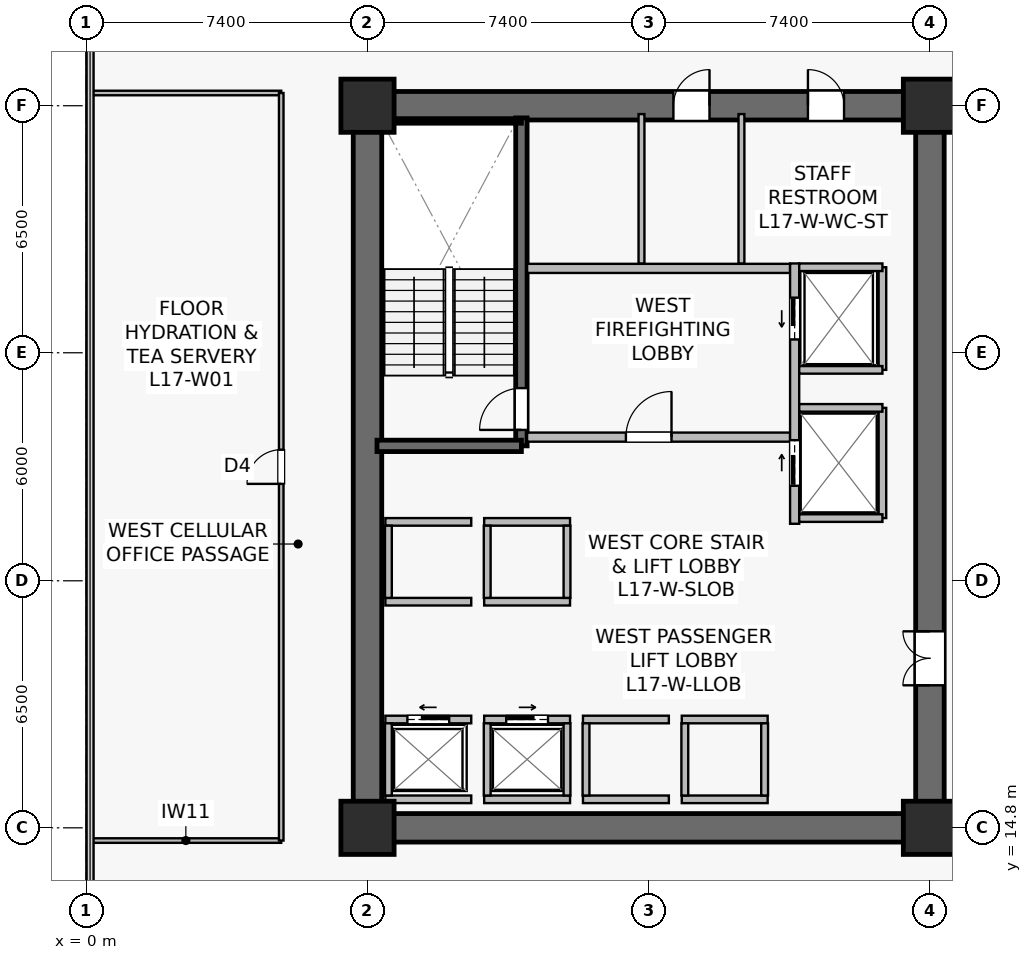
"""IFC4 building model, lengths in metres.
Left out: names, types, materials, properties, quantities, classifications, styles, units other than length and angle.
Written with IfcOpenShell. Run it as: python <this file> out.ifc"""

import sys

from ifc_helpers import new_model, si_unit, direction, frame, frame_2d, origin, origin_2d, place, context, subcontext, project, spatial, rectangle, extrude, source, transform, mapped, element, fill, save


model = new_model("IFC4")
c1 = context("Model", 3, precision=1e-05, world=origin(), true_north=direction((0.0, 1.0)))
c2 = subcontext(c1, "Body", "Model", "MODEL_VIEW")
j1 = project(units=[si_unit("LENGTHUNIT", "METRE"), si_unit("PLANEANGLEUNIT", "RADIAN")], contexts=[c1])
p1 = place(None, origin())
s1 = spatial("IfcSite", under=j1, at=p1, CompositionType="ELEMENT")
p2 = place(p1, origin())
s2 = spatial("IfcBuilding", under=s1, at=p2, CompositionType="ELEMENT")
p3 = place(p2, frame((0.0, 0.0, 70.3)))
s3 = spatial("IfcBuildingStorey", under=s2, at=p3, CompositionType="ELEMENT", Elevation=70.3)
p4 = place(p3, frame((7.025, 14.8, 0.0), z_axis=(0.0, 0.0, 1.0), x_axis=(1.0, 0.0, 0.0)))
e1 = element("IfcWall", 1, at=p4, inside=s3, PredefinedType="SHEAR", context=c2, shape_type="SweptSolid", body=[
    extrude(rectangle(XDim=15.55, YDim=0.75, at=frame_2d((7.775, 0.0))), origin(), (0.0, 0.0, 1.0), 3.78),
])
p5 = place(p3, frame((7.025, 33.8, 0.0), z_axis=(0.0, 0.0, 1.0), x_axis=(1.0, 0.0, 0.0)))
e2 = element("IfcWall", 2, at=p5, inside=s3, PredefinedType="SHEAR", context=c2, shape_type="SweptSolid", body=[
    extrude(rectangle(XDim=15.55, YDim=0.75, at=frame_2d((7.775, 0.0))), origin(), (0.0, 0.0, 1.0), 3.78),
])
p6 = place(p5, frame((8.425, 0.0, 0.0)))
e3 = element("IfcOpeningElement", 3, at=p6, cuts=e2, PredefinedType="OPENING", context=c2, shape_type="SweptSolid", body=[
    extrude(rectangle(XDim=0.95, YDim=2.15, at=frame_2d((0.475, 1.075))), frame((0.0, 0.385, 0.0), z_axis=(0.0, -1.0, 0.0), x_axis=(1.0, 0.0, 0.0)), (0.0, 0.0, 1.0), 0.77),
])
p7 = place(p5, frame((11.965, 0.0, 0.0)))
e4 = element("IfcOpeningElement", 4, at=p7, cuts=e2, PredefinedType="OPENING", context=c2, shape_type="SweptSolid", body=[
    extrude(rectangle(XDim=0.95, YDim=2.15, at=frame_2d((0.475, 1.075))), frame((0.0, 0.385, 0.0), z_axis=(0.0, -1.0, 0.0), x_axis=(1.0, 0.0, 0.0)), (0.0, 0.0, 1.0), 0.77),
])
p8 = place(p3, frame((7.4, 15.175, 0.0), z_axis=(0.0, 0.0, 1.0), x_axis=(0.0, 1.0, 0.0)))
e5 = element("IfcWall", 5, at=p8, inside=s3, PredefinedType="SHEAR", context=c2, shape_type="SweptSolid", body=[
    extrude(rectangle(XDim=18.25, YDim=0.75, at=frame_2d((9.125, 0.0))), origin(), (0.0, 0.0, 1.0), 3.78),
])
p9 = place(p3, frame((22.2, 15.175, 0.0), z_axis=(0.0, 0.0, 1.0), x_axis=(0.0, 1.0, 0.0)))
e6 = element("IfcWall", 6, at=p9, inside=s3, PredefinedType="SHEAR", context=c2, shape_type="SweptSolid", body=[
    extrude(rectangle(XDim=18.25, YDim=0.75, at=frame_2d((9.125, 0.0))), origin(), (0.0, 0.0, 1.0), 3.78),
])
p10 = place(p9, frame((3.375, 0.0, 0.0)))
e7 = element("IfcOpeningElement", 7, at=p10, cuts=e6, PredefinedType="OPENING", context=c2, shape_type="SweptSolid", body=[
    extrude(rectangle(XDim=1.42, YDim=2.2, at=frame_2d((0.71, 1.1))), frame((0.0, 0.385, 0.0), z_axis=(0.0, -1.0, 0.0), x_axis=(1.0, 0.0, 0.0)), (0.0, 0.0, 1.0), 0.77),
])
p11 = place(p3, frame((11.45, 24.85, 0.0), z_axis=(0.0, 0.0, 1.0), x_axis=(0.0, 1.0, 0.0)))
e8 = element("IfcWall", 8, at=p11, inside=s3, PredefinedType="SHEAR", context=c2, shape_type="SweptSolid", body=[
    extrude(rectangle(XDim=8.63, YDim=0.3, at=frame_2d((4.315, 0.0))), origin(), (0.0, 0.0, 1.0), 3.78),
])
p12 = place(p11, frame((0.42, 0.0, 0.0)))
e9 = element("IfcOpeningElement", 9, at=p12, cuts=e8, PredefinedType="OPENING", context=c2, shape_type="SweptSolid", body=[
    extrude(rectangle(XDim=1.1, YDim=2.15, at=frame_2d((0.55, 1.075))), frame((0.0, 0.16, 0.0), z_axis=(0.0, -1.0, 0.0), x_axis=(1.0, 0.0, 0.0)), (0.0, 0.0, 1.0), 0.32),
])
p13 = place(p3, frame((7.65, 24.85, 0.0), z_axis=(0.0, 0.0, 1.0), x_axis=(1.0, 0.0, 0.0)))
e10 = element("IfcWall", 10, at=p13, inside=s3, PredefinedType="SHEAR", context=c2, shape_type="SweptSolid", body=[
    extrude(rectangle(XDim=3.8, YDim=0.3, at=frame_2d((1.9, 0.0))), origin(), (0.0, 0.0, 1.0), 3.78),
])
p14 = place(p3, frame((7.73, 33.4, 0.0), z_axis=(0.0, 0.0, 1.0), x_axis=(1.0, 0.0, 0.0)))
e11 = element("IfcWall", 11, at=p14, inside=s3, PredefinedType="SOLIDWALL", context=c2, shape_type="SweptSolid", body=[
    extrude(rectangle(XDim=3.72, YDim=0.12, at=frame_2d((1.86, 0.0))), origin(), (0.0, 0.0, 1.0), 3.78),
])
m1 = source(origin(), c2, "Body", "SweptSolid", [
    extrude(rectangle(XDim=1.4, YDim=1.4, at=origin_2d()), origin(), (0.0, 0.0, 1.0), 4.1),
])
for number, where, z_axis, x_axis in (
    (12, (7.4, 14.8, 0.0), (0.0, 0.0, 1.0), (1.0, 0.0, 0.0)),
    (13, (22.2, 14.8, 0.0), (0.0, 0.0, 1.0), (1.0, 0.0, 0.0)),
    (14, (7.4, 33.8, 0.0), (0.0, 0.0, 1.0), (1.0, 0.0, 0.0)),
    (15, (22.2, 33.8, 0.0), (0.0, 0.0, 1.0), (1.0, 0.0, 0.0)),
):
    element("IfcColumn", number, at=place(p3, frame(where, z_axis=z_axis, x_axis=x_axis)), inside=s3, PredefinedType="COLUMN", context=c2, shape_type="MappedRepresentation", body=[
        mapped(m1, transform((0.0, 0.0, 0.0), scale=1.0)),
    ])
p15 = place(p3, frame((11.6, 25.08, 0.0), z_axis=(0.0, 0.0, 1.0), x_axis=(1.0, 0.0, 0.0)))
e16 = element("IfcWall", 16, at=p15, inside=s3, PredefinedType="SOLIDWALL", context=c2, shape_type="SweptSolid", body=[
    extrude(rectangle(XDim=6.92, YDim=0.24, at=frame_2d((3.46, 0.0))), origin(), (0.0, 0.0, 1.0), 3.115),
])
p16 = place(p15, frame((2.6, 0.0, 0.0)))
e17 = element("IfcOpeningElement", 17, at=p16, cuts=e16, PredefinedType="OPENING", context=c2, shape_type="SweptSolid", body=[
    extrude(rectangle(XDim=1.2, YDim=2.16, at=frame_2d((0.6, 1.08))), frame((0.0, 0.13, 0.0), z_axis=(0.0, -1.0, 0.0), x_axis=(1.0, 0.0, 0.0)), (0.0, 0.0, 1.0), 0.26),
])
p17 = place(p3, frame((11.6, 29.52, 0.0), z_axis=(0.0, 0.0, 1.0), x_axis=(1.0, 0.0, 0.0)))
e18 = element("IfcWall", 18, at=p17, inside=s3, PredefinedType="SOLIDWALL", context=c2, shape_type="SweptSolid", body=[
    extrude(rectangle(XDim=6.92, YDim=0.24, at=frame_2d((3.46, 0.0))), origin(), (0.0, 0.0, 1.0), 3.115),
])
p18 = place(p3, frame((18.64, 22.8, 0.0), z_axis=(0.0, 0.0, 1.0), x_axis=(0.0, 1.0, 0.0)))
e19 = element("IfcWall", 19, at=p18, inside=s3, PredefinedType="SOLIDWALL", context=c2, shape_type="SweptSolid", body=[
    extrude(rectangle(XDim=6.85, YDim=0.24, at=frame_2d((3.425, 0.0))), origin(), (0.0, 0.0, 1.0), 2.865),
])
p19 = place(p18, frame((4.85, 0.0, 0.0)))
e20 = element("IfcOpeningElement", 20, at=p19, cuts=e19, PredefinedType="OPENING", context=c2, shape_type="SweptSolid", body=[
    extrude(rectangle(XDim=1.1, YDim=2.22, at=frame_2d((0.55, 1.11))), frame((0.0, 0.13, 0.0), z_axis=(0.0, -1.0, 0.0), x_axis=(1.0, 0.0, 0.0)), (0.0, 0.0, 1.0), 0.26),
])
p20 = place(p18, frame((1.0, 0.0, 0.0)))
e21 = element("IfcOpeningElement", 21, at=p20, cuts=e19, PredefinedType="OPENING", context=c2, shape_type="SweptSolid", body=[
    extrude(rectangle(XDim=1.2, YDim=2.22, at=frame_2d((0.6, 1.11))), frame((0.0, 0.13, 0.0), z_axis=(0.0, -1.0, 0.0), x_axis=(1.0, 0.0, 0.0)), (0.0, 0.0, 1.0), 0.26),
])
p21 = place(p3, frame((7.87, 17.65, 0.0), z_axis=(0.0, 0.0, 1.0), x_axis=(1.0, 0.0, 0.0)))
e22 = element("IfcWall", 22, at=p21, inside=s3, PredefinedType="SOLIDWALL", context=c2, shape_type="SweptSolid", body=[
    extrude(rectangle(XDim=2.26, YDim=0.2, at=frame_2d((1.13, 0.0))), origin(), (0.0, 0.0, 1.0), 3.78),
])
p22 = place(p21, frame((0.58, 0.0, 0.0)))
e23 = element("IfcOpeningElement", 23, at=p22, cuts=e22, PredefinedType="OPENING", context=c2, shape_type="SweptSolid", body=[
    extrude(rectangle(XDim=1.1, YDim=2.22, at=frame_2d((0.55, 1.11))), frame((0.0, 0.11, 0.0), z_axis=(0.0, -1.0, 0.0), x_axis=(1.0, 0.0, 0.0)), (0.0, 0.0, 1.0), 0.22),
])
p23 = place(p3, frame((7.87, 15.55, 0.0), z_axis=(0.0, 0.0, 1.0), x_axis=(1.0, 0.0, 0.0)))
e24 = element("IfcWall", 24, at=p23, inside=s3, PredefinedType="SOLIDWALL", context=c2, shape_type="SweptSolid", body=[
    extrude(rectangle(XDim=2.26, YDim=0.2, at=frame_2d((1.13, 0.0))), origin(), (0.0, 0.0, 1.0), 3.78),
])
p24 = place(p3, frame((7.95, 15.65, 0.0), z_axis=(0.0, 0.0, 1.0), x_axis=(0.0, 1.0, 0.0)))
e25 = element("IfcWall", 25, at=p24, inside=s3, PredefinedType="SOLIDWALL", context=c2, shape_type="SweptSolid", body=[
    extrude(rectangle(XDim=1.9, YDim=0.18, at=frame_2d((0.95, 0.0))), origin(), (0.0, 0.0, 1.0), 3.78),
])
p25 = place(p3, frame((10.47, 17.65, 0.0), z_axis=(0.0, 0.0, 1.0), x_axis=(1.0, 0.0, 0.0)))
e26 = element("IfcWall", 26, at=p25, inside=s3, PredefinedType="SOLIDWALL", context=c2, shape_type="SweptSolid", body=[
    extrude(rectangle(XDim=2.26, YDim=0.2, at=frame_2d((1.13, 0.0))), origin(), (0.0, 0.0, 1.0), 3.78),
])
p26 = place(p25, frame((0.58, 0.0, 0.0)))
e27 = element("IfcOpeningElement", 27, at=p26, cuts=e26, PredefinedType="OPENING", context=c2, shape_type="SweptSolid", body=[
    extrude(rectangle(XDim=1.1, YDim=2.22, at=frame_2d((0.55, 1.11))), frame((0.0, 0.11, 0.0), z_axis=(0.0, -1.0, 0.0), x_axis=(1.0, 0.0, 0.0)), (0.0, 0.0, 1.0), 0.22),
])
p27 = place(p3, frame((10.47, 15.55, 0.0), z_axis=(0.0, 0.0, 1.0), x_axis=(1.0, 0.0, 0.0)))
e28 = element("IfcWall", 28, at=p27, inside=s3, PredefinedType="SOLIDWALL", context=c2, shape_type="SweptSolid", body=[
    extrude(rectangle(XDim=2.26, YDim=0.2, at=frame_2d((1.13, 0.0))), origin(), (0.0, 0.0, 1.0), 3.78),
])
for number, where, z_axis, x_axis in (
    (29, (10.55, 15.65, 0.0), (0.0, 0.0, 1.0), (0.0, 1.0, 0.0)),
    (30, (12.65, 15.65, 0.0), (0.0, 0.0, 1.0), (0.0, 1.0, 0.0)),
):
    element("IfcWall", number, at=place(p3, frame(where, z_axis=z_axis, x_axis=x_axis)), inside=s3, PredefinedType="SOLIDWALL", context=c2, shape_type="SweptSolid", body=[
        extrude(rectangle(XDim=1.9, YDim=0.18, at=frame_2d((0.95, 0.0))), origin(), (0.0, 0.0, 1.0), 3.78),
    ])
for number, where, z_axis, x_axis in (
    (31, (13.07, 17.65, 0.0), (0.0, 0.0, 1.0), (1.0, 0.0, 0.0)),
    (32, (13.07, 15.55, 0.0), (0.0, 0.0, 1.0), (1.0, 0.0, 0.0)),
):
    element("IfcWall", number, at=place(p3, frame(where, z_axis=z_axis, x_axis=x_axis)), inside=s3, PredefinedType="SOLIDWALL", context=c2, shape_type="SweptSolid", body=[
        extrude(rectangle(XDim=2.26, YDim=0.2, at=frame_2d((1.13, 0.0))), origin(), (0.0, 0.0, 1.0), 3.115),
    ])
p28 = place(p3, frame((13.15, 15.65, 0.0), z_axis=(0.0, 0.0, 1.0), x_axis=(0.0, 1.0, 0.0)))
e33 = element("IfcWall", 33, at=p28, inside=s3, PredefinedType="SOLIDWALL", context=c2, shape_type="SweptSolid", body=[
    extrude(rectangle(XDim=1.9, YDim=0.18, at=frame_2d((0.95, 0.0))), origin(), (0.0, 0.0, 1.0), 3.78),
])
for number, where, z_axis, x_axis in (
    (34, (15.67, 17.65, 0.0), (0.0, 0.0, 1.0), (1.0, 0.0, 0.0)),
    (35, (15.67, 15.55, 0.0), (0.0, 0.0, 1.0), (1.0, 0.0, 0.0)),
):
    element("IfcWall", number, at=place(p3, frame(where, z_axis=z_axis, x_axis=x_axis)), inside=s3, PredefinedType="SOLIDWALL", context=c2, shape_type="SweptSolid", body=[
        extrude(rectangle(XDim=2.26, YDim=0.2, at=frame_2d((1.13, 0.0))), origin(), (0.0, 0.0, 1.0), 3.78),
    ])
for number, where, z_axis, x_axis in (
    (36, (15.75, 15.65, 0.0), (0.0, 0.0, 1.0), (0.0, 1.0, 0.0)),
    (37, (17.85, 15.65, 0.0), (0.0, 0.0, 1.0), (0.0, 1.0, 0.0)),
):
    element("IfcWall", number, at=place(p3, frame(where, z_axis=z_axis, x_axis=x_axis)), inside=s3, PredefinedType="SOLIDWALL", context=c2, shape_type="SweptSolid", body=[
        extrude(rectangle(XDim=1.9, YDim=0.18, at=frame_2d((0.95, 0.0))), origin(), (0.0, 0.0, 1.0), 3.78),
    ])
for number, where, z_axis, x_axis in (
    (38, (7.87, 20.75, 0.0), (0.0, 0.0, 1.0), (1.0, 0.0, 0.0)),
    (39, (7.87, 22.85, 0.0), (0.0, 0.0, 1.0), (1.0, 0.0, 0.0)),
):
    element("IfcWall", number, at=place(p3, frame(where, z_axis=z_axis, x_axis=x_axis)), inside=s3, PredefinedType="SOLIDWALL", context=c2, shape_type="SweptSolid", body=[
        extrude(rectangle(XDim=2.26, YDim=0.2, at=frame_2d((1.13, 0.0))), origin(), (0.0, 0.0, 1.0), 3.78),
    ])
p29 = place(p3, frame((7.95, 20.85, 0.0), z_axis=(0.0, 0.0, 1.0), x_axis=(0.0, 1.0, 0.0)))
e40 = element("IfcWall", 40, at=p29, inside=s3, PredefinedType="SOLIDWALL", context=c2, shape_type="SweptSolid", body=[
    extrude(rectangle(XDim=1.9, YDim=0.18, at=frame_2d((0.95, 0.0))), origin(), (0.0, 0.0, 1.0), 3.78),
])
for number, where, z_axis, x_axis in (
    (41, (10.47, 20.75, 0.0), (0.0, 0.0, 1.0), (1.0, 0.0, 0.0)),
    (42, (10.47, 22.85, 0.0), (0.0, 0.0, 1.0), (1.0, 0.0, 0.0)),
):
    element("IfcWall", number, at=place(p3, frame(where, z_axis=z_axis, x_axis=x_axis)), inside=s3, PredefinedType="SOLIDWALL", context=c2, shape_type="SweptSolid", body=[
        extrude(rectangle(XDim=2.26, YDim=0.2, at=frame_2d((1.13, 0.0))), origin(), (0.0, 0.0, 1.0), 3.78),
    ])
for number, where, z_axis, x_axis in (
    (43, (10.55, 20.85, 0.0), (0.0, 0.0, 1.0), (0.0, 1.0, 0.0)),
    (44, (12.65, 20.85, 0.0), (0.0, 0.0, 1.0), (0.0, 1.0, 0.0)),
):
    element("IfcWall", number, at=place(p3, frame(where, z_axis=z_axis, x_axis=x_axis)), inside=s3, PredefinedType="SOLIDWALL", context=c2, shape_type="SweptSolid", body=[
        extrude(rectangle(XDim=1.9, YDim=0.18, at=frame_2d((0.95, 0.0))), origin(), (0.0, 0.0, 1.0), 3.78),
    ])
p30 = place(p3, frame((20.95, 26.85, 0.0), z_axis=(0.0, 0.0, 1.0), x_axis=(0.0, 1.0, 0.0)))
e45 = element("IfcWall", 45, at=p30, inside=s3, PredefinedType="SOLIDWALL", context=c2, shape_type="SweptSolid", body=[
    extrude(rectangle(XDim=2.7, YDim=0.2, at=frame_2d((1.35, 0.0))), origin(), (0.0, 0.0, 1.0), 3.78),
])
p31 = place(p3, frame((18.76, 29.55, 0.0), z_axis=(0.0, 0.0, 1.0), x_axis=(1.0, 0.0, 0.0)))
e46 = element("IfcWall", 46, at=p31, inside=s3, PredefinedType="SOLIDWALL", context=c2, shape_type="SweptSolid", body=[
    extrude(rectangle(XDim=2.19, YDim=0.2, at=frame_2d((1.095, 0.0))), origin(), (0.0, 0.0, 1.0), 3.78),
])
p32 = place(p3, frame((18.76, 26.85, 0.0), z_axis=(0.0, 0.0, 1.0), x_axis=(1.0, 0.0, 0.0)))
e47 = element("IfcWall", 47, at=p32, inside=s3, PredefinedType="SOLIDWALL", context=c2, shape_type="SweptSolid", body=[
    extrude(rectangle(XDim=2.19, YDim=0.2, at=frame_2d((1.095, 0.0))), origin(), (0.0, 0.0, 1.0), 3.177),
])
p33 = place(p3, frame((20.95, 22.95, 0.0), z_axis=(0.0, 0.0, 1.0), x_axis=(0.0, 1.0, 0.0)))
e48 = element("IfcWall", 48, at=p33, inside=s3, PredefinedType="SOLIDWALL", context=c2, shape_type="SweptSolid", body=[
    extrude(rectangle(XDim=2.9, YDim=0.2, at=frame_2d((1.45, 0.0))), origin(), (0.0, 0.0, 1.0), 2.865),
])
for number, where, z_axis, x_axis in (
    (49, (18.76, 25.85, 0.0), (0.0, 0.0, 1.0), (1.0, 0.0, 0.0)),
    (50, (18.76, 22.95, 0.0), (0.0, 0.0, 1.0), (1.0, 0.0, 0.0)),
):
    element("IfcWall", number, at=place(p3, frame(where, z_axis=z_axis, x_axis=x_axis)), inside=s3, PredefinedType="SOLIDWALL", context=c2, shape_type="SweptSolid", body=[
        extrude(rectangle(XDim=2.19, YDim=0.2, at=frame_2d((1.095, 0.0))), origin(), (0.0, 0.0, 1.0), 3.78),
    ])
p34 = place(p3, frame((14.61, 29.65, 0.0), z_axis=(0.0, 0.0, 1.0), x_axis=(0.0, 1.0, 0.0)))
e51 = element("IfcWall", 51, at=p34, inside=s3, PredefinedType="PLUMBINGWALL", context=c2, shape_type="SweptSolid", body=[
    extrude(rectangle(XDim=3.93, YDim=0.155, at=frame_2d((1.965, 0.0))), origin(), (0.0, 0.0, 1.0), 3.115),
])
p35 = place(p3, frame((17.24, 29.65, 0.0), z_axis=(0.0, 0.0, 1.0), x_axis=(0.0, 1.0, 0.0)))
e52 = element("IfcWall", 52, at=p35, inside=s3, PredefinedType="PLUMBINGWALL", context=c2, shape_type="SweptSolid", body=[
    extrude(rectangle(XDim=3.93, YDim=0.155, at=frame_2d((1.965, 0.0))), origin(), (0.0, 0.0, 1.0), 3.78),
])
for number, where, z_axis, x_axis in (
    (53, (0.11, 14.465, 0.0), (0.0, 0.0, 1.0), (1.0, 0.0, 0.0)),
    (54, (0.11, 34.135, 0.0), (0.0, 0.0, 1.0), (1.0, 0.0, 0.0)),
):
    element("IfcWall", number, at=place(p3, frame(where, z_axis=z_axis, x_axis=x_axis)), inside=s3, PredefinedType="PARTITIONING", context=c2, shape_type="SweptSolid", body=[
        extrude(rectangle(XDim=5.02, YDim=0.12, at=frame_2d((2.51, 0.0))), origin(), (0.0, 0.0, 1.0), 3.78),
    ])
p36 = place(p3, frame((5.13, 14.465, 0.0), z_axis=(0.0, 0.0, 1.0), x_axis=(0.0, 1.0, 0.0)))
e55 = element("IfcWall", 55, at=p36, inside=s3, PredefinedType="PARTITIONING", context=c2, shape_type="SweptSolid", body=[
    extrude(rectangle(XDim=19.67, YDim=0.12, at=frame_2d((9.835, 0.0))), origin(), (0.0, 0.0, 1.0), 3.78),
])
p37 = place(p36, frame((9.385, 0.0, 0.0)))
e56 = element("IfcOpeningElement", 56, at=p37, cuts=e55, PredefinedType="OPENING", context=c2, shape_type="SweptSolid", body=[
    extrude(rectangle(XDim=0.9, YDim=2.1, at=frame_2d((0.45, 1.05))), frame((0.0, 0.07, 0.0), z_axis=(0.0, -1.0, 0.0), x_axis=(1.0, 0.0, 0.0)), (0.0, 0.0, 1.0), 0.14),
])
m2 = source(origin(), c2, "Body", "SweptSolid", [
    extrude(rectangle(XDim=1.1, YDim=2.15, at=frame_2d((0.55, 1.075))), frame((0.0, 0.025, 0.0), z_axis=(0.0, -1.0, 0.0), x_axis=(1.0, 0.0, 0.0)), (0.0, 0.0, 1.0), 0.05),
])
p38 = place(p12, origin())
e57 = element("IfcDoor", 57, at=p38, inside=s3, OperationType="SINGLE_SWING_LEFT", PredefinedType="DOOR", context=c2, shape_type="MappedRepresentation", body=[
    mapped(m2, transform((0.0, 0.0, 0.0), scale=1.0)),
])
fill(e9, e57)
m3 = source(origin(), c2, "Body", "SweptSolid", [
    extrude(rectangle(XDim=1.2, YDim=2.16, at=frame_2d((0.6, 1.08))), frame((0.0, 0.025, 0.0), z_axis=(0.0, -1.0, 0.0), x_axis=(1.0, 0.0, 0.0)), (0.0, 0.0, 1.0), 0.05),
])
p39 = place(p16, origin())
e58 = element("IfcDoor", 58, at=p39, inside=s3, OperationType="SINGLE_SWING_RIGHT", PredefinedType="DOOR", context=c2, shape_type="MappedRepresentation", body=[
    mapped(m3, transform((0.0, 0.0, 0.0), scale=1.0)),
])
fill(e17, e58)
m4 = source(origin(), c2, "Body", "SweptSolid", [
    extrude(rectangle(XDim=1.1, YDim=2.22, at=frame_2d((0.55, 1.11))), frame((0.0, 0.025, 0.0), z_axis=(0.0, -1.0, 0.0), x_axis=(1.0, 0.0, 0.0)), (0.0, 0.0, 1.0), 0.05),
])
p40 = place(p22, origin())
e59 = element("IfcDoor", 59, at=p40, inside=s3, OperationType="SLIDING_TO_LEFT", PredefinedType="USERDEFINED", context=c2, shape_type="MappedRepresentation", body=[
    mapped(m4, transform((0.0, 0.0, 0.0), scale=1.0)),
])
fill(e23, e59)
p41 = place(p26, origin())
e60 = element("IfcDoor", 60, at=p41, inside=s3, OperationType="SLIDING_TO_RIGHT", PredefinedType="USERDEFINED", context=c2, shape_type="MappedRepresentation", body=[
    mapped(m4, transform((0.0, 0.0, 0.0), scale=1.0)),
])
fill(e27, e60)
p42 = place(p19, origin())
e61 = element("IfcDoor", 61, at=p42, inside=s3, OperationType="SLIDING_TO_LEFT", PredefinedType="USERDEFINED", context=c2, shape_type="MappedRepresentation", body=[
    mapped(m4, transform((0.0, 0.0, 0.0), scale=1.0)),
])
fill(e20, e61)
m5 = source(origin(), c2, "Body", "SweptSolid", [
    extrude(rectangle(XDim=1.2, YDim=2.22, at=frame_2d((0.6, 1.11))), frame((0.0, 0.025, 0.0), z_axis=(0.0, -1.0, 0.0), x_axis=(1.0, 0.0, 0.0)), (0.0, 0.0, 1.0), 0.05),
])
p43 = place(p20, origin())
e62 = element("IfcDoor", 62, at=p43, inside=s3, OperationType="SLIDING_TO_RIGHT", PredefinedType="USERDEFINED", context=c2, shape_type="MappedRepresentation", body=[
    mapped(m5, transform((0.0, 0.0, 0.0), scale=1.0)),
])
fill(e21, e62)
m6 = source(origin(), c2, "Body", "SweptSolid", [
    extrude(rectangle(XDim=1.42, YDim=2.2, at=frame_2d((0.71, 1.1))), frame((0.0, 0.025, 0.0), z_axis=(0.0, -1.0, 0.0), x_axis=(1.0, 0.0, 0.0)), (0.0, 0.0, 1.0), 0.05),
])
p44 = place(p10, origin())
e63 = element("IfcDoor", 63, at=p44, inside=s3, OperationType="DOUBLE_DOOR_SINGLE_SWING", PredefinedType="DOOR", context=c2, shape_type="MappedRepresentation", body=[
    mapped(m6, transform((0.0, 0.0, 0.0), scale=1.0)),
])
fill(e7, e63)
m7 = source(origin(), c2, "Body", "SweptSolid", [
    extrude(rectangle(XDim=0.95, YDim=2.15, at=frame_2d((0.475, 1.075))), frame((0.0, 0.025, 0.0), z_axis=(0.0, -1.0, 0.0), x_axis=(1.0, 0.0, 0.0)), (0.0, 0.0, 1.0), 0.05),
])
p45 = place(p6, origin())
e64 = element("IfcDoor", 64, at=p45, inside=s3, OperationType="SINGLE_SWING_RIGHT", PredefinedType="DOOR", context=c2, shape_type="MappedRepresentation", body=[
    mapped(m7, transform((0.0, 0.0, 0.0), scale=1.0)),
])
fill(e3, e64)
p46 = place(p7, origin())
e65 = element("IfcDoor", 65, at=p46, inside=s3, OperationType="SINGLE_SWING_LEFT", PredefinedType="DOOR", context=c2, shape_type="MappedRepresentation", body=[
    mapped(m7, transform((0.0, 0.0, 0.0), scale=1.0)),
])
fill(e4, e65)
m8 = source(origin(), c2, "Body", "SweptSolid", [
    extrude(rectangle(XDim=0.9, YDim=2.1, at=frame_2d((0.45, 1.05))), frame((0.0, 0.025, 0.0), z_axis=(0.0, -1.0, 0.0), x_axis=(1.0, 0.0, 0.0)), (0.0, 0.0, 1.0), 0.05),
])
p47 = place(p37, origin())
e66 = element("IfcDoor", 66, at=p47, inside=s3, OperationType="SINGLE_SWING_LEFT", PredefinedType="DOOR", context=c2, shape_type="MappedRepresentation", body=[
    mapped(m8, transform((0.0, 0.0, 0.0), scale=1.0)),
])
fill(e56, e66)
save(model, sys.argv[1])
